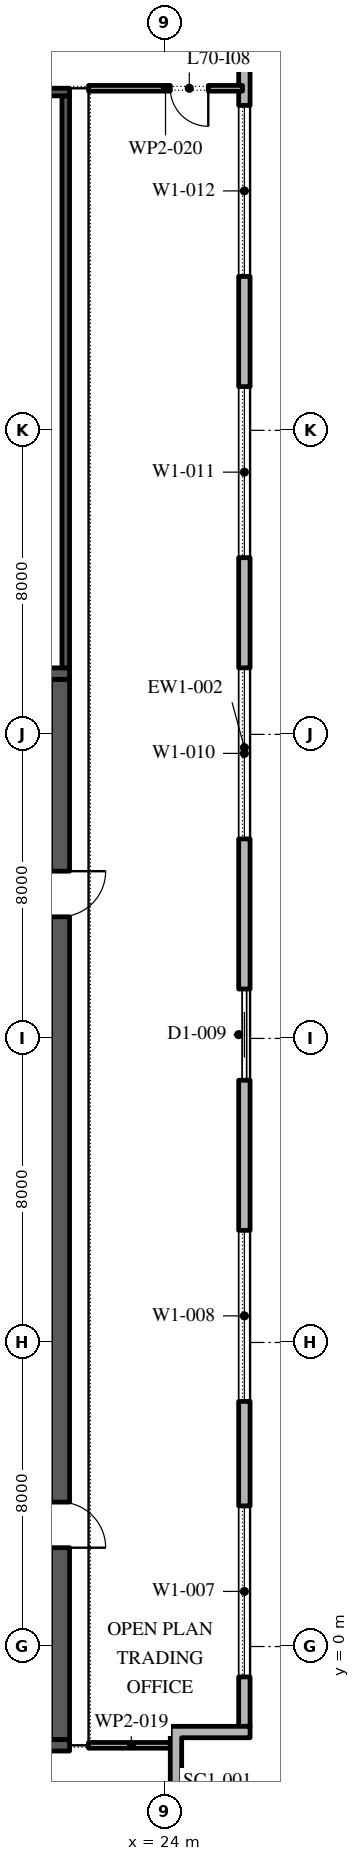
"""IFC4 building model, lengths in metres.
Left out: names, types, materials, properties, quantities, classifications, styles, units other than length and angle.
Written with IfcOpenShell. Run it as: python <this file> out.ifc"""

import sys

from ifc_helpers import new_model, si_unit, direction, frame, frame_2d, origin, place, context, subcontext, project, spatial, polyline, rectangle, outline, extrude, element, fill, save


model = new_model("IFC4")
c1 = context("Model", 3, precision=1e-05, world=origin(), true_north=direction((0.0, 1.0)))
c2 = subcontext(c1, "Body", "Model", "MODEL_VIEW")
j1 = project(units=[si_unit("LENGTHUNIT", "METRE"), si_unit("PLANEANGLEUNIT", "RADIAN")], contexts=[c1])
p1 = place(None, origin())
s1 = spatial("IfcSite", under=j1, at=p1, CompositionType="ELEMENT")
p2 = place(p1, origin())
s2 = spatial("IfcBuilding", under=s1, at=p2, CompositionType="ELEMENT")
p3 = place(p2, frame((0.0, 0.0, 321.6)))
s3 = spatial("IfcBuildingStorey", under=s2, at=p3, CompositionType="ELEMENT", Elevation=321.6)
p4 = place(p3, frame((26.1, -2.1, 0.0), z_axis=(0.0, 0.0, 1.0), x_axis=(0.0, 1.0, 0.0)))
e1 = element("IfcWall", 1, at=p4, inside=s3, PredefinedType="STANDARD", context=c2, shape_type="SweptSolid", body=[
    extrude(rectangle(XDim=51.5, YDim=0.3, at=frame_2d((25.75, 0.0))), origin(), (0.0, 0.0, 1.0), 4.0),
])
p5 = place(p4, frame((1.3, 0.0, 0.45)))
e2 = element("IfcOpeningElement", 2, at=p5, cuts=e1, PredefinedType="OPENING", context=c2, shape_type="SweptSolid", body=[
    extrude(rectangle(XDim=4.5, YDim=3.05, at=frame_2d((2.25, 1.525))), frame((0.0, 0.16, 0.0), z_axis=(0.0, -1.0, 0.0), x_axis=(1.0, 0.0, 0.0)), (0.0, 0.0, 1.0), 0.32),
])
p6 = place(p4, frame((8.55, 0.0, 0.45)))
e3 = element("IfcOpeningElement", 3, at=p6, cuts=e1, PredefinedType="OPENING", context=c2, shape_type="SweptSolid", body=[
    extrude(rectangle(XDim=4.5, YDim=3.05, at=frame_2d((2.25, 1.525))), frame((0.0, 0.16, 0.0), z_axis=(0.0, -1.0, 0.0), x_axis=(1.0, 0.0, 0.0)), (0.0, 0.0, 1.0), 0.32),
])
p7 = place(p4, frame((17.0, 0.0, 0.0)))
e4 = element("IfcOpeningElement", 4, at=p7, cuts=e1, PredefinedType="OPENING", context=c2, shape_type="SweptSolid", body=[
    extrude(rectangle(XDim=2.4, YDim=3.5, at=frame_2d((1.2, 1.75))), frame((0.0, 0.16, 0.0), z_axis=(0.0, -1.0, 0.0), x_axis=(1.0, 0.0, 0.0)), (0.0, 0.0, 1.0), 0.32),
])
p8 = place(p4, frame((23.35, 0.0, 0.45)))
e5 = element("IfcOpeningElement", 5, at=p8, cuts=e1, PredefinedType="OPENING", context=c2, shape_type="SweptSolid", body=[
    extrude(rectangle(XDim=4.5, YDim=3.05, at=frame_2d((2.25, 1.525))), frame((0.0, 0.16, 0.0), z_axis=(0.0, -1.0, 0.0), x_axis=(1.0, 0.0, 0.0)), (0.0, 0.0, 1.0), 0.32),
])
p9 = place(p4, frame((30.75, 0.0, 0.45)))
e6 = element("IfcOpeningElement", 6, at=p9, cuts=e1, PredefinedType="OPENING", context=c2, shape_type="SweptSolid", body=[
    extrude(rectangle(XDim=4.5, YDim=3.05, at=frame_2d((2.25, 1.525))), frame((0.0, 0.16, 0.0), z_axis=(0.0, -1.0, 0.0), x_axis=(1.0, 0.0, 0.0)), (0.0, 0.0, 1.0), 0.32),
])
p10 = place(p4, frame((38.15, 0.0, 0.45)))
e7 = element("IfcOpeningElement", 7, at=p10, cuts=e1, PredefinedType="OPENING", context=c2, shape_type="SweptSolid", body=[
    extrude(rectangle(XDim=4.5, YDim=3.05, at=frame_2d((2.25, 1.525))), frame((0.0, 0.16, 0.0), z_axis=(0.0, -1.0, 0.0), x_axis=(1.0, 0.0, 0.0)), (0.0, 0.0, 1.0), 0.32),
])
p11 = place(p4, frame((46.6, 0.0, 0.0)))
e8 = element("IfcOpeningElement", 8, at=p11, cuts=e1, PredefinedType="OPENING", context=c2, shape_type="SweptSolid", body=[
    extrude(rectangle(XDim=2.4, YDim=3.5, at=frame_2d((1.2, 1.75))), frame((0.0, 0.16, 0.0), z_axis=(0.0, -1.0, 0.0), x_axis=(1.0, 0.0, 0.0)), (0.0, 0.0, 1.0), 0.32),
])
p12 = place(p3, origin())
e9 = element("IfcWall", 9, at=p12, inside=s3, PredefinedType="STANDARD", context=c2, shape_type="SweptSolid", body=[
    extrude(outline(polyline([(24.15, -3.9), (24.15, -2.1), (26.25, -2.1), (26.25, -2.4), (24.45, -2.4), (24.45, -4.2), (22.65, -4.2), (22.65, -5.7), (22.35, -5.7), (22.35, -3.9), (24.15, -3.9)])), origin(), (0.0, 0.0, 1.0), 4.0),
])
p13 = place(p3, frame((21.25, -2.45, 0.0), z_axis=(0.0, 0.0, 1.0), x_axis=(0.0, 1.0, 0.0)))
e10 = element("IfcWall", 10, at=p13, inside=s3, PredefinedType="SHEAR", context=c2, shape_type="SweptSolid", body=[
    extrude(rectangle(XDim=27.9, YDim=0.5, at=frame_2d((13.95, 0.0))), origin(), (0.0, 0.0, 1.0), 4.0),
])
p14 = place(p13, frame((5.05, 0.0, 0.0)))
e11 = element("IfcOpeningElement", 11, at=p14, cuts=e10, PredefinedType="OPENING", context=c2, shape_type="SweptSolid", body=[
    extrude(rectangle(XDim=1.2, YDim=2.1, at=frame_2d((0.6, 1.05))), frame((0.0, 0.26, 0.0), z_axis=(0.0, -1.0, 0.0), x_axis=(1.0, 0.0, 0.0)), (0.0, 0.0, 1.0), 0.52),
])
p15 = place(p13, frame((21.65, 0.0, 0.0)))
e12 = element("IfcOpeningElement", 12, at=p15, cuts=e10, PredefinedType="OPENING", context=c2, shape_type="SweptSolid", body=[
    extrude(rectangle(XDim=1.2, YDim=2.1, at=frame_2d((0.6, 1.05))), frame((0.0, 0.26, 0.0), z_axis=(0.0, -1.0, 0.0), x_axis=(1.0, 0.0, 0.0)), (0.0, 0.0, 1.0), 0.52),
])
for number, where, z_axis, x_axis in (
    (13, (10.5, -2.6, 0.0), (0.0, 0.0, 1.0), (1.0, 0.0, 0.0)),
    (14, (10.5, 25.6, 0.0), (0.0, 0.0, 1.0), (1.0, 0.0, 0.0)),
):
    element("IfcWall", number, at=place(p3, frame(where, z_axis=z_axis, x_axis=x_axis)), inside=s3, PredefinedType="SHEAR", context=c2, shape_type="SweptSolid", body=[
        extrude(rectangle(XDim=11.0, YDim=0.3, at=frame_2d((5.5, 0.0))), origin(), (0.0, 0.0, 1.0), 4.0),
    ])
p16 = place(p3, frame((21.4, 25.75, 0.0), z_axis=(0.0, 0.0, 1.0), x_axis=(0.0, 1.0, 0.0)))
e15 = element("IfcWall", 15, at=p16, inside=s3, PredefinedType="SHEAR", context=c2, shape_type="SweptSolid", body=[
    extrude(rectangle(XDim=15.05, YDim=0.2, at=frame_2d((7.525, 0.0))), origin(), (0.0, 0.0, 1.0), 4.0),
])
p17 = place(p3, frame((10.5, 40.9, 0.0), z_axis=(0.0, 0.0, 1.0), x_axis=(1.0, 0.0, 0.0)))
e16 = element("IfcWall", 16, at=p17, inside=s3, PredefinedType="SHEAR", context=c2, shape_type="SweptSolid", body=[
    extrude(rectangle(XDim=11.0, YDim=0.2, at=frame_2d((5.5, 0.0))), origin(), (0.0, 0.0, 1.0), 4.0),
])
p18 = place(p3, frame((22.0, -2.6, 0.0), z_axis=(0.0, 0.0, 1.0), x_axis=(1.0, 0.0, 0.0)))
e17 = element("IfcWall", 17, at=p18, inside=s3, PredefinedType="PARTITIONING", context=c2, shape_type="SweptSolid", body=[
    extrude(rectangle(XDim=2.25, YDim=0.15, at=frame_2d((1.125, 0.0))), origin(), (0.0, 0.0, 1.0), 4.0),
])
p19 = place(p3, frame((26.05, 41.0, 0.0), z_axis=(0.0, 0.0, 1.0), x_axis=(-1.0, 0.0, 0.0)))
e18 = element("IfcWall", 18, at=p19, inside=s3, PredefinedType="PARTITIONING", context=c2, shape_type="SweptSolid", body=[
    extrude(rectangle(XDim=4.05, YDim=0.15, at=frame_2d((2.025, 0.0))), origin(), (0.0, 0.0, 1.0), 4.0),
])
p20 = place(p19, frame((0.9, 0.0, 0.0)))
e19 = element("IfcOpeningElement", 19, at=p20, cuts=e18, PredefinedType="OPENING", context=c2, shape_type="SweptSolid", body=[
    extrude(rectangle(XDim=1.0, YDim=2.1, at=frame_2d((0.5, 1.05))), frame((0.0, 0.085, 0.0), z_axis=(0.0, -1.0, 0.0), x_axis=(1.0, 0.0, 0.0)), (0.0, 0.0, 1.0), 0.17),
])
p21 = place(p5, origin())
e20 = element("IfcWindow", 20, at=p21, inside=s3, PartitioningType="DOUBLE_PANEL_VERTICAL", PredefinedType="WINDOW", context=c2, shape_type="SweptSolid", body=[
    extrude(rectangle(XDim=4.5, YDim=3.05, at=frame_2d((2.25, 1.525))), frame((0.0, 0.03, 0.0), z_axis=(0.0, -1.0, 0.0), x_axis=(1.0, 0.0, 0.0)), (0.0, 0.0, 1.0), 0.06),
])
fill(e2, e20)
p22 = place(p6, origin())
e21 = element("IfcWindow", 21, at=p22, inside=s3, PartitioningType="DOUBLE_PANEL_VERTICAL", PredefinedType="WINDOW", context=c2, shape_type="SweptSolid", body=[
    extrude(rectangle(XDim=4.5, YDim=3.05, at=frame_2d((2.25, 1.525))), frame((0.0, 0.03, 0.0), z_axis=(0.0, -1.0, 0.0), x_axis=(1.0, 0.0, 0.0)), (0.0, 0.0, 1.0), 0.06),
])
fill(e3, e21)
p23 = place(p7, origin())
e22 = element("IfcDoor", 22, at=p23, inside=s3, OperationType="DOUBLE_DOOR_SLIDING", PredefinedType="DOOR", context=c2, shape_type="SweptSolid", body=[
    extrude(rectangle(XDim=2.4, YDim=3.5, at=frame_2d((1.2, 1.75))), frame((0.0, 0.025, 0.0), z_axis=(0.0, -1.0, 0.0), x_axis=(1.0, 0.0, 0.0)), (0.0, 0.0, 1.0), 0.05),
])
fill(e4, e22)
p24 = place(p8, origin())
e23 = element("IfcWindow", 23, at=p24, inside=s3, PartitioningType="DOUBLE_PANEL_VERTICAL", PredefinedType="WINDOW", context=c2, shape_type="SweptSolid", body=[
    extrude(rectangle(XDim=4.5, YDim=3.05, at=frame_2d((2.25, 1.525))), frame((0.0, 0.03, 0.0), z_axis=(0.0, -1.0, 0.0), x_axis=(1.0, 0.0, 0.0)), (0.0, 0.0, 1.0), 0.06),
])
fill(e5, e23)
p25 = place(p9, origin())
e24 = element("IfcWindow", 24, at=p25, inside=s3, PartitioningType="DOUBLE_PANEL_VERTICAL", PredefinedType="WINDOW", context=c2, shape_type="SweptSolid", body=[
    extrude(rectangle(XDim=4.5, YDim=3.05, at=frame_2d((2.25, 1.525))), frame((0.0, 0.03, 0.0), z_axis=(0.0, -1.0, 0.0), x_axis=(1.0, 0.0, 0.0)), (0.0, 0.0, 1.0), 0.06),
])
fill(e6, e24)
p26 = place(p10, origin())
e25 = element("IfcWindow", 25, at=p26, inside=s3, PartitioningType="DOUBLE_PANEL_VERTICAL", PredefinedType="WINDOW", context=c2, shape_type="SweptSolid", body=[
    extrude(rectangle(XDim=4.5, YDim=3.05, at=frame_2d((2.25, 1.525))), frame((0.0, 0.03, 0.0), z_axis=(0.0, -1.0, 0.0), x_axis=(1.0, 0.0, 0.0)), (0.0, 0.0, 1.0), 0.06),
])
fill(e7, e25)
p27 = place(p14, frame((1.2, 0.0, 0.0), z_axis=(0.0, 0.0, 1.0), x_axis=(-1.0, 0.0, 0.0)))
e26 = element("IfcDoor", 26, at=p27, inside=s3, OperationType="SINGLE_SWING_LEFT", PredefinedType="DOOR", context=c2, shape_type="SweptSolid", body=[
    extrude(rectangle(XDim=1.2, YDim=2.1, at=frame_2d((0.6, 1.05))), frame((0.0, 0.025, 0.0), z_axis=(0.0, -1.0, 0.0), x_axis=(1.0, 0.0, 0.0)), (0.0, 0.0, 1.0), 0.05),
])
fill(e11, e26)
p28 = place(p15, frame((1.2, 0.0, 0.0), z_axis=(0.0, 0.0, 1.0), x_axis=(-1.0, 0.0, 0.0)))
e27 = element("IfcDoor", 27, at=p28, inside=s3, OperationType="SINGLE_SWING_RIGHT", PredefinedType="DOOR", context=c2, shape_type="SweptSolid", body=[
    extrude(rectangle(XDim=1.2, YDim=2.1, at=frame_2d((0.6, 1.05))), frame((0.0, 0.025, 0.0), z_axis=(0.0, -1.0, 0.0), x_axis=(1.0, 0.0, 0.0)), (0.0, 0.0, 1.0), 0.05),
])
fill(e12, e27)
p29 = place(p20, origin())
e28 = element("IfcDoor", 28, at=p29, inside=s3, OperationType="SINGLE_SWING_RIGHT", PredefinedType="DOOR", context=c2, shape_type="SweptSolid", body=[
    extrude(rectangle(XDim=1.0, YDim=2.1, at=frame_2d((0.5, 1.05))), frame((0.0, 0.025, 0.0), z_axis=(0.0, -1.0, 0.0), x_axis=(1.0, 0.0, 0.0)), (0.0, 0.0, 1.0), 0.05),
])
fill(e19, e28)
save(model, sys.argv[1])
